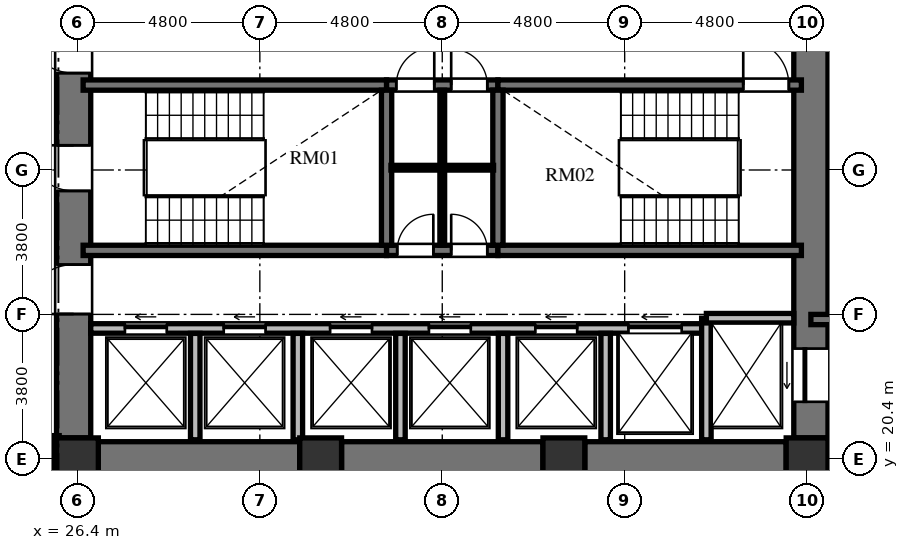
"""IFC4 building model, lengths in metres.
Left out: names, types, materials, properties, quantities, classifications, styles, units other than length and angle.
Written with IfcOpenShell. Run it as: python <this file> out.ifc"""

import sys

from ifc_helpers import new_model, si_unit, direction, frame, frame_2d, origin, origin_2d, place, context, subcontext, project, spatial, rectangle, extrude, element, fill, save


model = new_model("IFC4")
c1 = context("Model", 3, precision=1e-05, world=origin(), true_north=direction((0.0, 1.0)))
c2 = subcontext(c1, "Body", "Model", "MODEL_VIEW")
j1 = project(units=[si_unit("LENGTHUNIT", "METRE"), si_unit("PLANEANGLEUNIT", "RADIAN")], contexts=[c1])
p1 = place(None, origin())
s1 = spatial("IfcSite", under=j1, at=p1, CompositionType="ELEMENT")
p2 = place(p1, origin())
s2 = spatial("IfcBuilding", under=s1, at=p2, CompositionType="ELEMENT")
p3 = place(p2, frame((0.0, 0.0, 65.328)))
s3 = spatial("IfcBuildingStorey", under=s2, at=p3, CompositionType="ELEMENT", Elevation=65.328)
for number, where, z_axis, x_axis in (
    (1, (26.4, 20.4, 0.0), (0.0, 0.0, 1.0), (1.0, 0.0, 0.0)),
    (2, (32.8, 20.4, 0.0), (0.0, 0.0, 1.0), (1.0, 0.0, 0.0)),
    (3, (39.2, 20.4, 0.0), (0.0, 0.0, 1.0), (1.0, 0.0, 0.0)),
    (4, (45.6, 20.4, 0.0), (0.0, 0.0, 1.0), (1.0, 0.0, 0.0)),
):
    element("IfcColumn", number, at=place(p3, frame(where, z_axis=z_axis, x_axis=x_axis)), inside=s3, PredefinedType="COLUMN", context=c2, shape_type="SweptSolid", body=[
        extrude(rectangle(XDim=1.1, YDim=1.1, at=origin_2d()), origin(), (0.0, 0.0, 1.0), 3.648),
    ])
p4 = place(p3, frame((26.3, 20.95, 0.0), z_axis=(0.0, 0.0, 1.0), x_axis=(0.0, 1.0, 0.0)))
e5 = element("IfcWall", 5, at=p4, inside=s3, PredefinedType="SHEAR", context=c2, shape_type="SweptSolid", body=[
    extrude(rectangle(XDim=14.1, YDim=0.9, at=frame_2d((7.05, 0.0))), origin(), (0.0, 0.0, 1.0), 3.648),
])
p5 = place(p4, frame((6.5, 0.0, 0.0)))
e6 = element("IfcOpeningElement", 6, at=p5, cuts=e5, PredefinedType="OPENING", context=c2, shape_type="SweptSolid", body=[
    extrude(rectangle(XDim=1.2, YDim=2.15, at=frame_2d((0.6, 1.075))), frame((0.0, 0.46, 0.0), z_axis=(0.0, -1.0, 0.0), x_axis=(1.0, 0.0, 0.0)), (0.0, 0.0, 1.0), 0.92),
])
p6 = place(p4, frame((9.6, 0.0, 0.0)))
e7 = element("IfcOpeningElement", 7, at=p6, cuts=e5, PredefinedType="OPENING", context=c2, shape_type="SweptSolid", body=[
    extrude(rectangle(XDim=1.3, YDim=2.2, at=frame_2d((0.65, 1.1))), frame((0.0, 0.46, 0.0), z_axis=(0.0, -1.0, 0.0), x_axis=(1.0, 0.0, 0.0)), (0.0, 0.0, 1.0), 0.92),
])
p7 = place(p4, frame((3.26, 0.0, 0.0)))
e8 = element("IfcOpeningElement", 8, at=p7, cuts=e5, PredefinedType="OPENING", context=c2, shape_type="SweptSolid", body=[
    extrude(rectangle(XDim=1.3, YDim=2.2, at=frame_2d((0.65, 1.1))), frame((0.0, 0.46, 0.0), z_axis=(0.0, -1.0, 0.0), x_axis=(1.0, 0.0, 0.0)), (0.0, 0.0, 1.0), 0.92),
])
p8 = place(p3, frame((45.7, 20.95, 0.0), z_axis=(0.0, 0.0, 1.0), x_axis=(0.0, 1.0, 0.0)))
e9 = element("IfcWall", 9, at=p8, inside=s3, PredefinedType="SHEAR", context=c2, shape_type="SweptSolid", body=[
    extrude(rectangle(XDim=14.1, YDim=0.9, at=frame_2d((7.05, 0.0))), origin(), (0.0, 0.0, 1.0), 3.648),
])
p9 = place(p8, frame((11.75, 0.0, 0.0)))
e10 = element("IfcOpeningElement", 10, at=p9, cuts=e9, PredefinedType="OPENING", context=c2, shape_type="SweptSolid", body=[
    extrude(rectangle(XDim=1.4, YDim=2.3, at=frame_2d((0.7, 1.15))), frame((0.0, 0.46, 0.0), z_axis=(0.0, -1.0, 0.0), x_axis=(1.0, 0.0, 0.0)), (0.0, 0.0, 1.0), 0.92),
])
p10 = place(p8, frame((0.95, 0.0, 0.0)))
e11 = element("IfcOpeningElement", 11, at=p10, cuts=e9, PredefinedType="OPENING", context=c2, shape_type="SweptSolid", body=[
    extrude(rectangle(XDim=1.4, YDim=2.3, at=frame_2d((0.7, 1.15))), frame((0.0, 0.46, 0.0), z_axis=(0.0, -1.0, 0.0), x_axis=(1.0, 0.0, 0.0)), (0.0, 0.0, 1.0), 0.92),
])
p11 = place(p3, frame((26.95, 20.4, 0.0), z_axis=(0.0, 0.0, 1.0), x_axis=(1.0, 0.0, 0.0)))
e12 = element("IfcWall", 12, at=p11, inside=s3, PredefinedType="SHEAR", context=c2, shape_type="SweptSolid", body=[
    extrude(rectangle(XDim=5.3, YDim=0.9, at=frame_2d((2.65, 0.0))), origin(), (0.0, 0.0, 1.0), 3.648),
])
p12 = place(p3, frame((33.35, 20.4, 0.0), z_axis=(0.0, 0.0, 1.0), x_axis=(1.0, 0.0, 0.0)))
e13 = element("IfcWall", 13, at=p12, inside=s3, PredefinedType="SHEAR", context=c2, shape_type="SweptSolid", body=[
    extrude(rectangle(XDim=5.3, YDim=0.9, at=frame_2d((2.65, 0.0))), origin(), (0.0, 0.0, 1.0), 3.648),
])
p13 = place(p3, frame((39.75, 20.4, 0.0), z_axis=(0.0, 0.0, 1.0), x_axis=(1.0, 0.0, 0.0)))
e14 = element("IfcWall", 14, at=p13, inside=s3, PredefinedType="SHEAR", context=c2, shape_type="SweptSolid", body=[
    extrude(rectangle(XDim=5.3, YDim=0.9, at=frame_2d((2.65, 0.0))), origin(), (0.0, 0.0, 1.0), 3.648),
])
p14 = place(p3, frame((26.55, 30.235, 0.0), z_axis=(0.0, 0.0, 1.0), x_axis=(1.0, 0.0, 0.0)))
e15 = element("IfcWall", 15, at=p14, inside=s3, PredefinedType="SHEAR", context=c2, shape_type="SweptSolid", body=[
    extrude(rectangle(XDim=7.985, YDim=0.27, at=frame_2d((3.992, 0.0))), origin(), (0.0, 0.0, 1.0), 3.648),
])
p15 = place(p3, frame((34.535, 30.235, 0.0), z_axis=(0.0, 0.0, 1.0), x_axis=(1.0, 0.0, 0.0)))
e16 = element("IfcWall", 16, at=p15, inside=s3, PredefinedType="SHEAR", context=c2, shape_type="SweptSolid", body=[
    extrude(rectangle(XDim=2.93, YDim=0.27, at=frame_2d((1.465, 0.0))), origin(), (0.0, 0.0, 1.0), 3.648),
])
p16 = place(p15, frame((0.255, 0.0, 0.0)))
e17 = element("IfcOpeningElement", 17, at=p16, cuts=e16, PredefinedType="OPENING", context=c2, shape_type="SweptSolid", body=[
    extrude(rectangle(XDim=1.0, YDim=2.1, at=frame_2d((0.5, 1.05))), frame((0.0, 0.145, 0.0), z_axis=(0.0, -1.0, 0.0), x_axis=(1.0, 0.0, 0.0)), (0.0, 0.0, 1.0), 0.29),
])
p17 = place(p15, frame((1.7, 0.0, 0.0)))
e18 = element("IfcOpeningElement", 18, at=p17, cuts=e16, PredefinedType="OPENING", context=c2, shape_type="SweptSolid", body=[
    extrude(rectangle(XDim=0.95, YDim=2.1, at=frame_2d((0.475, 1.05))), frame((0.0, 0.145, 0.0), z_axis=(0.0, -1.0, 0.0), x_axis=(1.0, 0.0, 0.0)), (0.0, 0.0, 1.0), 0.29),
])
p18 = place(p3, frame((37.465, 30.235, 0.0), z_axis=(0.0, 0.0, 1.0), x_axis=(1.0, 0.0, 0.0)))
e19 = element("IfcWall", 19, at=p18, inside=s3, PredefinedType="SHEAR", context=c2, shape_type="SweptSolid", body=[
    extrude(rectangle(XDim=7.985, YDim=0.27, at=frame_2d((3.992, 0.0))), origin(), (0.0, 0.0, 1.0), 3.648),
])
p19 = place(p18, frame((6.455, 0.0, 0.0)))
e20 = element("IfcOpeningElement", 20, at=p19, cuts=e19, PredefinedType="OPENING", context=c2, shape_type="SweptSolid", body=[
    extrude(rectangle(XDim=1.2, YDim=2.15, at=frame_2d((0.6, 1.075))), frame((0.0, 0.145, 0.0), z_axis=(0.0, -1.0, 0.0), x_axis=(1.0, 0.0, 0.0)), (0.0, 0.0, 1.0), 0.29),
])
p20 = place(p3, frame((26.55, 25.885, 0.0), z_axis=(0.0, 0.0, 1.0), x_axis=(1.0, 0.0, 0.0)))
e21 = element("IfcWall", 21, at=p20, inside=s3, PredefinedType="SHEAR", context=c2, shape_type="SweptSolid", body=[
    extrude(rectangle(XDim=7.985, YDim=0.27, at=frame_2d((3.992, 0.0))), origin(), (0.0, 0.0, 1.0), 3.648),
])
p21 = place(p3, frame((34.535, 25.885, 0.0), z_axis=(0.0, 0.0, 1.0), x_axis=(1.0, 0.0, 0.0)))
e22 = element("IfcWall", 22, at=p21, inside=s3, PredefinedType="SHEAR", context=c2, shape_type="SweptSolid", body=[
    extrude(rectangle(XDim=2.93, YDim=0.27, at=frame_2d((1.465, 0.0))), origin(), (0.0, 0.0, 1.0), 3.648),
])
p22 = place(p21, frame((0.28, 0.0, 0.0)))
e23 = element("IfcOpeningElement", 23, at=p22, cuts=e22, PredefinedType="OPENING", context=c2, shape_type="SweptSolid", body=[
    extrude(rectangle(XDim=0.95, YDim=2.1, at=frame_2d((0.475, 1.05))), frame((0.0, 0.145, 0.0), z_axis=(0.0, -1.0, 0.0), x_axis=(1.0, 0.0, 0.0)), (0.0, 0.0, 1.0), 0.29),
])
p23 = place(p21, frame((1.7, 0.0, 0.0)))
e24 = element("IfcOpeningElement", 24, at=p23, cuts=e22, PredefinedType="OPENING", context=c2, shape_type="SweptSolid", body=[
    extrude(rectangle(XDim=0.95, YDim=2.1, at=frame_2d((0.475, 1.05))), frame((0.0, 0.145, 0.0), z_axis=(0.0, -1.0, 0.0), x_axis=(1.0, 0.0, 0.0)), (0.0, 0.0, 1.0), 0.29),
])
p24 = place(p3, frame((37.465, 25.885, 0.0), z_axis=(0.0, 0.0, 1.0), x_axis=(1.0, 0.0, 0.0)))
e25 = element("IfcWall", 25, at=p24, inside=s3, PredefinedType="SHEAR", context=c2, shape_type="SweptSolid", body=[
    extrude(rectangle(XDim=7.985, YDim=0.27, at=frame_2d((3.992, 0.0))), origin(), (0.0, 0.0, 1.0), 3.648),
])
for number, where, z_axis, x_axis in (
    (26, (34.535, 26.02, 0.0), (0.0, 0.0, 1.0), (0.0, 1.0, 0.0)),
    (27, (37.465, 26.02, 0.0), (0.0, 0.0, 1.0), (0.0, 1.0, 0.0)),
):
    element("IfcWall", number, at=place(p3, frame(where, z_axis=z_axis, x_axis=x_axis)), inside=s3, PredefinedType="SHEAR", context=c2, shape_type="SweptSolid", body=[
        extrude(rectangle(XDim=4.08, YDim=0.27, at=frame_2d((2.04, 0.0))), origin(), (0.0, 0.0, 1.0), 3.648),
    ])
p25 = place(p3, frame((34.65, 28.06, 0.0), z_axis=(0.0, 0.0, 1.0), x_axis=(1.0, 0.0, 0.0)))
e28 = element("IfcWall", 28, at=p25, inside=s3, PredefinedType="PARTITIONING", context=c2, shape_type="SweptSolid", body=[
    extrude(rectangle(XDim=2.7, YDim=0.125, at=frame_2d((1.35, 0.0))), origin(), (0.0, 0.0, 1.0), 3.428),
])
p26 = place(p3, frame((36.0, 26.02, 0.0), z_axis=(0.0, 0.0, 1.0), x_axis=(0.0, 1.0, 0.0)))
e29 = element("IfcWall", 29, at=p26, inside=s3, PredefinedType="PARTITIONING", context=c2, shape_type="SweptSolid", body=[
    extrude(rectangle(XDim=4.08, YDim=0.125, at=frame_2d((2.04, 0.0))), origin(), (0.0, 0.0, 1.0), 3.428),
])
p27 = place(p3, frame((26.75, 23.83, 0.0), z_axis=(0.0, 0.0, 1.0), x_axis=(1.0, 0.0, 0.0)))
e30 = element("IfcWall", 30, at=p27, inside=s3, PredefinedType="SOLIDWALL", context=c2, shape_type="SweptSolid", body=[
    extrude(rectangle(XDim=16.2, YDim=0.25, at=frame_2d((8.1, 0.0))), origin(), (0.0, 0.0, 1.0), 3.428),
])
p28 = place(p27, frame((0.9, 0.0, 0.0)))
e31 = element("IfcOpeningElement", 31, at=p28, cuts=e30, PredefinedType="OPENING", context=c2, shape_type="SweptSolid", body=[
    extrude(rectangle(XDim=1.1, YDim=2.2, at=frame_2d((0.55, 1.1))), frame((0.0, 0.135, 0.0), z_axis=(0.0, -1.0, 0.0), x_axis=(1.0, 0.0, 0.0)), (0.0, 0.0, 1.0), 0.27),
])
p29 = place(p27, frame((3.5, 0.0, 0.0)))
e32 = element("IfcOpeningElement", 32, at=p29, cuts=e30, PredefinedType="OPENING", context=c2, shape_type="SweptSolid", body=[
    extrude(rectangle(XDim=1.1, YDim=2.2, at=frame_2d((0.55, 1.1))), frame((0.0, 0.135, 0.0), z_axis=(0.0, -1.0, 0.0), x_axis=(1.0, 0.0, 0.0)), (0.0, 0.0, 1.0), 0.27),
])
p30 = place(p27, frame((6.3, 0.0, 0.0)))
e33 = element("IfcOpeningElement", 33, at=p30, cuts=e30, PredefinedType="OPENING", context=c2, shape_type="SweptSolid", body=[
    extrude(rectangle(XDim=1.1, YDim=2.2, at=frame_2d((0.55, 1.1))), frame((0.0, 0.135, 0.0), z_axis=(0.0, -1.0, 0.0), x_axis=(1.0, 0.0, 0.0)), (0.0, 0.0, 1.0), 0.27),
])
p31 = place(p27, frame((8.9, 0.0, 0.0)))
e34 = element("IfcOpeningElement", 34, at=p31, cuts=e30, PredefinedType="OPENING", context=c2, shape_type="SweptSolid", body=[
    extrude(rectangle(XDim=1.1, YDim=2.2, at=frame_2d((0.55, 1.1))), frame((0.0, 0.135, 0.0), z_axis=(0.0, -1.0, 0.0), x_axis=(1.0, 0.0, 0.0)), (0.0, 0.0, 1.0), 0.27),
])
p32 = place(p27, frame((11.7, 0.0, 0.0)))
e35 = element("IfcOpeningElement", 35, at=p32, cuts=e30, PredefinedType="OPENING", context=c2, shape_type="SweptSolid", body=[
    extrude(rectangle(XDim=1.1, YDim=2.2, at=frame_2d((0.55, 1.1))), frame((0.0, 0.135, 0.0), z_axis=(0.0, -1.0, 0.0), x_axis=(1.0, 0.0, 0.0)), (0.0, 0.0, 1.0), 0.27),
])
p33 = place(p27, frame((14.15, 0.0, 0.0)))
e36 = element("IfcOpeningElement", 36, at=p33, cuts=e30, PredefinedType="OPENING", context=c2, shape_type="SweptSolid", body=[
    extrude(rectangle(XDim=1.4, YDim=2.3, at=frame_2d((0.7, 1.15))), frame((0.0, 0.135, 0.0), z_axis=(0.0, -1.0, 0.0), x_axis=(1.0, 0.0, 0.0)), (0.0, 0.0, 1.0), 0.27),
])
p34 = place(p3, frame((42.95, 20.9, 0.0), z_axis=(0.0, 0.0, 1.0), x_axis=(0.0, 1.0, 0.0)))
e37 = element("IfcWall", 37, at=p34, inside=s3, PredefinedType="SOLIDWALL", context=c2, shape_type="SweptSolid", body=[
    extrude(rectangle(XDim=3.2, YDim=0.25, at=frame_2d((1.6, 0.0))), origin(), (0.0, 0.0, 1.0), 3.428),
])
p35 = place(p3, frame((42.95, 24.1, 0.0), z_axis=(0.0, 0.0, 1.0), x_axis=(1.0, 0.0, 0.0)))
e38 = element("IfcWall", 38, at=p35, inside=s3, PredefinedType="SOLIDWALL", context=c2, shape_type="SweptSolid", body=[
    extrude(rectangle(XDim=2.3, YDim=0.25, at=frame_2d((1.15, 0.0))), origin(), (0.0, 0.0, 1.0), 3.428),
])
for number, where, z_axis, x_axis in (
    (39, (29.5, 20.9, 0.0), (0.0, 0.0, 1.0), (0.0, 1.0, 0.0)),
    (40, (32.2, 20.9, 0.0), (0.0, 0.0, 1.0), (0.0, 1.0, 0.0)),
    (41, (34.9, 20.9, 0.0), (0.0, 0.0, 1.0), (0.0, 1.0, 0.0)),
    (42, (37.6, 20.9, 0.0), (0.0, 0.0, 1.0), (0.0, 1.0, 0.0)),
    (43, (40.3, 20.9, 0.0), (0.0, 0.0, 1.0), (0.0, 1.0, 0.0)),
):
    element("IfcWall", number, at=place(p3, frame(where, z_axis=z_axis, x_axis=x_axis)), inside=s3, PredefinedType="SOLIDWALL", context=c2, shape_type="SweptSolid", body=[
        extrude(rectangle(XDim=2.8, YDim=0.25, at=frame_2d((1.4, 0.0))), origin(), (0.0, 0.0, 1.0), 3.428),
    ])
p36 = place(p3, frame((45.7, 24.065, 0.0), z_axis=(0.0, 0.0, 1.0), x_axis=(1.0, 0.0, 0.0)))
e44 = element("IfcWall", 44, at=p36, inside=s3, PredefinedType="SHEAR", context=c2, shape_type="SweptSolid", body=[
    extrude(rectangle(XDim=4.715, YDim=0.27, at=frame_2d((2.357, 0.0))), origin(), (0.0, 0.0, 1.0), 3.648),
])
p37 = place(p3, frame((45.7, 20.02, 0.0), z_axis=(0.0, 0.0, 1.0), x_axis=(1.0, 0.0, 0.0)))
e45 = element("IfcWall", 45, at=p37, inside=s3, PredefinedType="SOLIDWALL", context=c2, shape_type="SweptSolid", body=[
    extrude(rectangle(XDim=4.715, YDim=0.25, at=frame_2d((2.357, 0.0))), origin(), (0.0, 0.0, 1.0), 2.813),
])
p38 = place(p3, frame((25.83, 21.01, 0.0), z_axis=(0.0, 0.0, 1.0), x_axis=(0.0, -1.0, 0.0)))
e46 = element("IfcWall", 46, at=p38, inside=s3, PredefinedType="PARTITIONING", context=c2, shape_type="SweptSolid", body=[
    extrude(rectangle(XDim=1.22, YDim=0.18, at=frame_2d((0.61, 0.0))), origin(), (0.0, 0.0, 1.0), 3.428),
])
p39 = place(p5, origin())
e47 = element("IfcDoor", 47, at=p39, inside=s3, OperationType="SINGLE_SWING_RIGHT", PredefinedType="DOOR", context=c2, shape_type="SweptSolid", body=[
    extrude(rectangle(XDim=1.2, YDim=2.15, at=frame_2d((0.6, 1.075))), frame((0.0, 0.025, 0.0), z_axis=(0.0, -1.0, 0.0), x_axis=(1.0, 0.0, 0.0)), (0.0, 0.0, 1.0), 0.05),
])
fill(e6, e47)
p40 = place(p19, origin())
e48 = element("IfcDoor", 48, at=p40, inside=s3, OperationType="SINGLE_SWING_LEFT", PredefinedType="DOOR", context=c2, shape_type="SweptSolid", body=[
    extrude(rectangle(XDim=1.2, YDim=2.15, at=frame_2d((0.6, 1.075))), frame((0.0, 0.025, 0.0), z_axis=(0.0, -1.0, 0.0), x_axis=(1.0, 0.0, 0.0)), (0.0, 0.0, 1.0), 0.05),
])
fill(e20, e48)
p41 = place(p22, origin())
e49 = element("IfcDoor", 49, at=p41, inside=s3, OperationType="SINGLE_SWING_RIGHT", PredefinedType="DOOR", context=c2, shape_type="SweptSolid", body=[
    extrude(rectangle(XDim=0.95, YDim=2.1, at=frame_2d((0.475, 1.05))), frame((0.0, 0.025, 0.0), z_axis=(0.0, -1.0, 0.0), x_axis=(1.0, 0.0, 0.0)), (0.0, 0.0, 1.0), 0.05),
])
fill(e23, e49)
p42 = place(p23, origin())
e50 = element("IfcDoor", 50, at=p42, inside=s3, OperationType="SINGLE_SWING_LEFT", PredefinedType="DOOR", context=c2, shape_type="SweptSolid", body=[
    extrude(rectangle(XDim=0.95, YDim=2.1, at=frame_2d((0.475, 1.05))), frame((0.0, 0.025, 0.0), z_axis=(0.0, -1.0, 0.0), x_axis=(1.0, 0.0, 0.0)), (0.0, 0.0, 1.0), 0.05),
])
fill(e24, e50)
p43 = place(p16, origin())
e51 = element("IfcDoor", 51, at=p43, inside=s3, OperationType="SINGLE_SWING_RIGHT", PredefinedType="DOOR", context=c2, shape_type="SweptSolid", body=[
    extrude(rectangle(XDim=1.0, YDim=2.1, at=frame_2d((0.5, 1.05))), frame((0.0, 0.025, 0.0), z_axis=(0.0, -1.0, 0.0), x_axis=(1.0, 0.0, 0.0)), (0.0, 0.0, 1.0), 0.05),
])
fill(e17, e51)
p44 = place(p17, origin())
e52 = element("IfcDoor", 52, at=p44, inside=s3, OperationType="SINGLE_SWING_LEFT", PredefinedType="DOOR", context=c2, shape_type="SweptSolid", body=[
    extrude(rectangle(XDim=0.95, YDim=2.1, at=frame_2d((0.475, 1.05))), frame((0.0, 0.025, 0.0), z_axis=(0.0, -1.0, 0.0), x_axis=(1.0, 0.0, 0.0)), (0.0, 0.0, 1.0), 0.05),
])
fill(e18, e52)
p45 = place(p6, origin())
e53 = element("IfcDoor", 53, at=p45, inside=s3, OperationType="SINGLE_SWING_RIGHT", PredefinedType="DOOR", context=c2, shape_type="SweptSolid", body=[
    extrude(rectangle(XDim=1.3, YDim=2.2, at=frame_2d((0.65, 1.1))), frame((0.0, 0.025, 0.0), z_axis=(0.0, -1.0, 0.0), x_axis=(1.0, 0.0, 0.0)), (0.0, 0.0, 1.0), 0.05),
])
fill(e7, e53)
p46 = place(p7, origin())
e54 = element("IfcDoor", 54, at=p46, inside=s3, OperationType="SINGLE_SWING_LEFT", PredefinedType="DOOR", context=c2, shape_type="SweptSolid", body=[
    extrude(rectangle(XDim=1.3, YDim=2.2, at=frame_2d((0.65, 1.1))), frame((0.0, 0.025, 0.0), z_axis=(0.0, -1.0, 0.0), x_axis=(1.0, 0.0, 0.0)), (0.0, 0.0, 1.0), 0.05),
])
fill(e8, e54)
p47 = place(p28, origin())
e55 = element("IfcDoor", 55, at=p47, inside=s3, OperationType="SLIDING_TO_LEFT", PredefinedType="DOOR", context=c2, shape_type="SweptSolid", body=[
    extrude(rectangle(XDim=1.1, YDim=2.2, at=frame_2d((0.55, 1.1))), frame((0.0, 0.025, 0.0), z_axis=(0.0, -1.0, 0.0), x_axis=(1.0, 0.0, 0.0)), (0.0, 0.0, 1.0), 0.05),
])
fill(e31, e55)
p48 = place(p29, origin())
e56 = element("IfcDoor", 56, at=p48, inside=s3, OperationType="SLIDING_TO_LEFT", PredefinedType="DOOR", context=c2, shape_type="SweptSolid", body=[
    extrude(rectangle(XDim=1.1, YDim=2.2, at=frame_2d((0.55, 1.1))), frame((0.0, 0.025, 0.0), z_axis=(0.0, -1.0, 0.0), x_axis=(1.0, 0.0, 0.0)), (0.0, 0.0, 1.0), 0.05),
])
fill(e32, e56)
p49 = place(p30, origin())
e57 = element("IfcDoor", 57, at=p49, inside=s3, OperationType="SLIDING_TO_LEFT", PredefinedType="DOOR", context=c2, shape_type="SweptSolid", body=[
    extrude(rectangle(XDim=1.1, YDim=2.2, at=frame_2d((0.55, 1.1))), frame((0.0, 0.025, 0.0), z_axis=(0.0, -1.0, 0.0), x_axis=(1.0, 0.0, 0.0)), (0.0, 0.0, 1.0), 0.05),
])
fill(e33, e57)
p50 = place(p31, origin())
e58 = element("IfcDoor", 58, at=p50, inside=s3, OperationType="SLIDING_TO_LEFT", PredefinedType="DOOR", context=c2, shape_type="SweptSolid", body=[
    extrude(rectangle(XDim=1.1, YDim=2.2, at=frame_2d((0.55, 1.1))), frame((0.0, 0.025, 0.0), z_axis=(0.0, -1.0, 0.0), x_axis=(1.0, 0.0, 0.0)), (0.0, 0.0, 1.0), 0.05),
])
fill(e34, e58)
p51 = place(p32, origin())
e59 = element("IfcDoor", 59, at=p51, inside=s3, OperationType="SLIDING_TO_LEFT", PredefinedType="DOOR", context=c2, shape_type="SweptSolid", body=[
    extrude(rectangle(XDim=1.1, YDim=2.2, at=frame_2d((0.55, 1.1))), frame((0.0, 0.025, 0.0), z_axis=(0.0, -1.0, 0.0), x_axis=(1.0, 0.0, 0.0)), (0.0, 0.0, 1.0), 0.05),
])
fill(e35, e59)
p52 = place(p10, origin())
e60 = element("IfcDoor", 60, at=p52, inside=s3, OperationType="SLIDING_TO_LEFT", PredefinedType="DOOR", context=c2, shape_type="SweptSolid", body=[
    extrude(rectangle(XDim=1.4, YDim=2.3, at=frame_2d((0.7, 1.15))), frame((0.0, 0.025, 0.0), z_axis=(0.0, -1.0, 0.0), x_axis=(1.0, 0.0, 0.0)), (0.0, 0.0, 1.0), 0.05),
])
fill(e11, e60)
p53 = place(p33, origin())
e61 = element("IfcDoor", 61, at=p53, inside=s3, OperationType="SLIDING_TO_LEFT", PredefinedType="DOOR", context=c2, shape_type="SweptSolid", body=[
    extrude(rectangle(XDim=1.4, YDim=2.3, at=frame_2d((0.7, 1.15))), frame((0.0, 0.025, 0.0), z_axis=(0.0, -1.0, 0.0), x_axis=(1.0, 0.0, 0.0)), (0.0, 0.0, 1.0), 0.05),
])
fill(e36, e61)
save(model, sys.argv[1])
